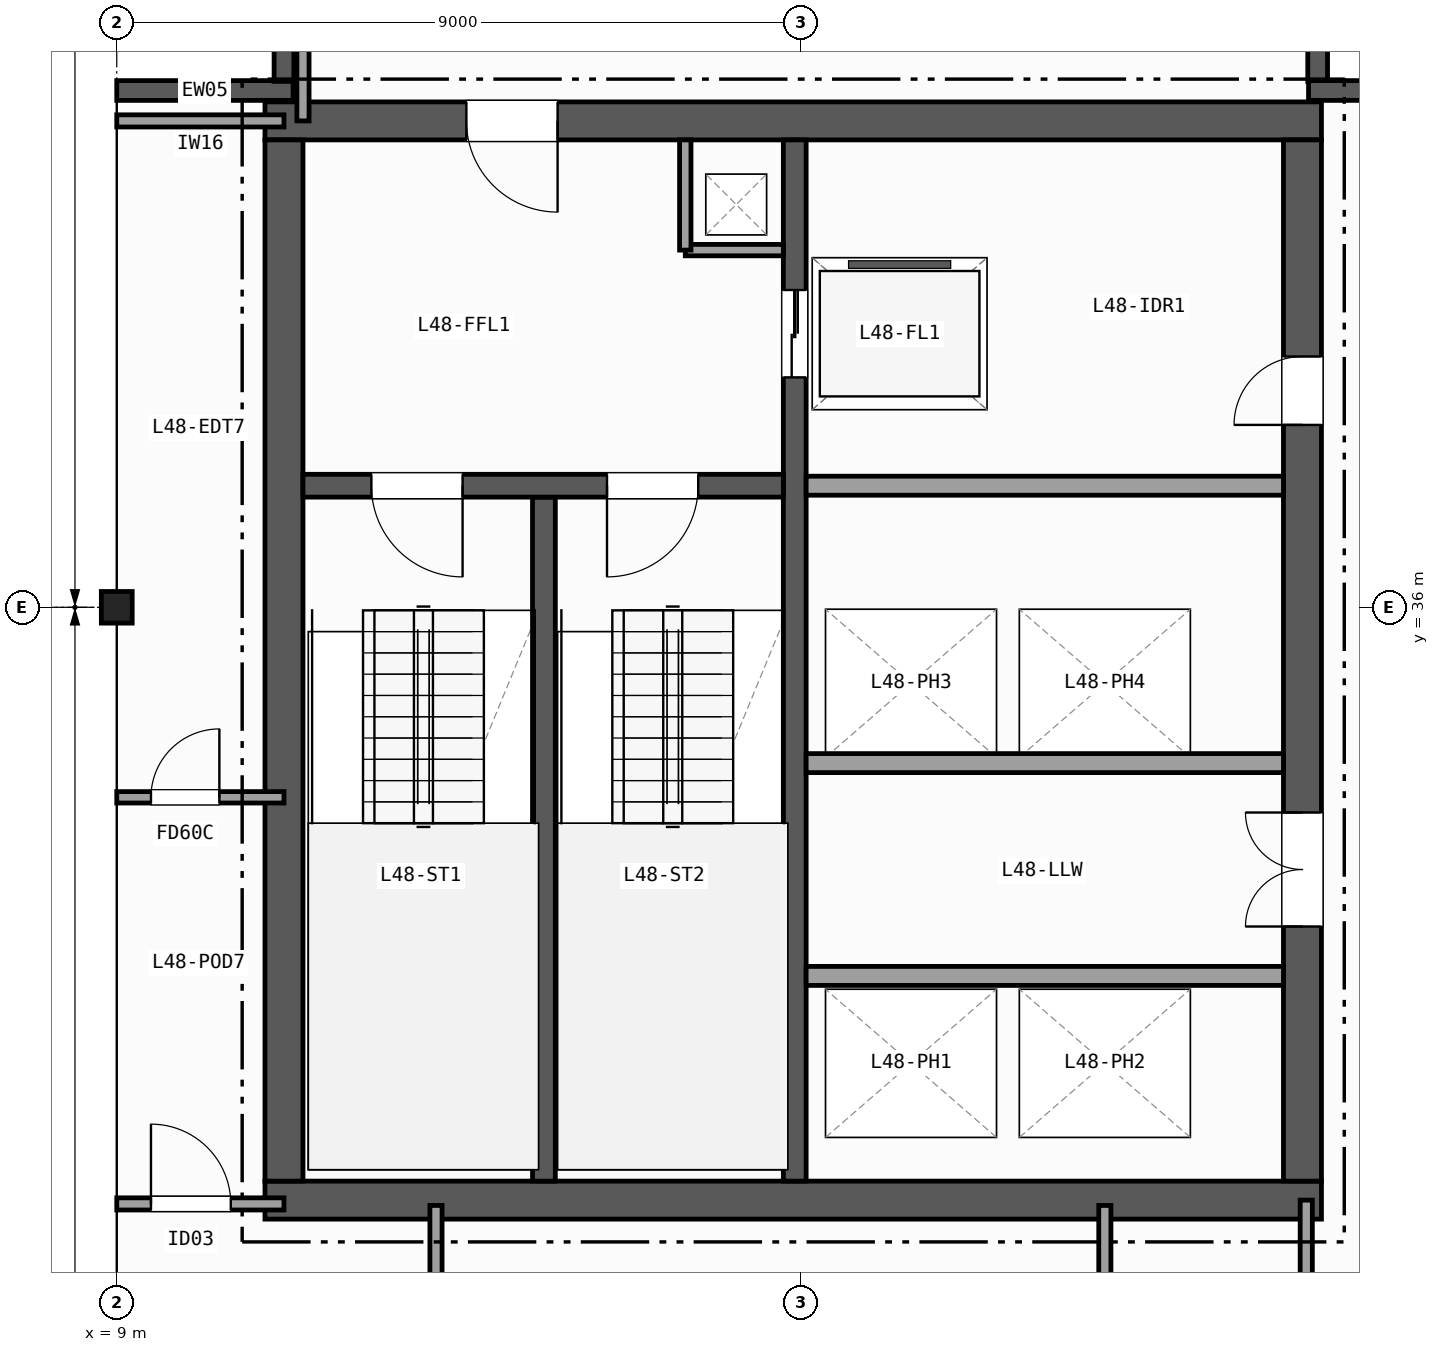
"""IFC4 building model, lengths in metres.
Left out: names, types, materials, properties, quantities, classifications, styles, units other than length and angle.
Written with IfcOpenShell. Run it as: python <this file> out.ifc"""

import sys

from ifc_helpers import new_model, si_unit, direction, frame, frame_2d, origin, origin_2d, place, context, subcontext, project, spatial, rectangle, i_section, extrude, element, fill, save


model = new_model("IFC4")
c1 = context("Model", 3, precision=1e-05, world=origin(), true_north=direction((0.0, 1.0)))
c2 = subcontext(c1, "Body", "Model", "MODEL_VIEW")
j1 = project(units=[si_unit("LENGTHUNIT", "METRE"), si_unit("PLANEANGLEUNIT", "RADIAN")], contexts=[c1])
p1 = place(None, origin())
s1 = spatial("IfcSite", under=j1, at=p1, CompositionType="ELEMENT")
p2 = place(p1, origin())
s2 = spatial("IfcBuilding", under=s1, at=p2, CompositionType="ELEMENT")
p3 = place(p2, frame((0.0, 0.0, 192.7)))
s3 = spatial("IfcBuildingStorey", under=s2, at=p3, CompositionType="ELEMENT", Elevation=192.7)
p4 = place(p3, frame((9.0, 36.0, 0.0), z_axis=(0.0, 0.0, 1.0), x_axis=(1.0, 0.0, 0.0)))
e1 = element("IfcColumn", 1, at=p4, inside=s3, PredefinedType="COLUMN", context=c2, shape_type="SweptSolid", body=[
    extrude(i_section(OverallWidth=0.406, OverallDepth=0.416, WebThickness=0.03, FlangeThickness=0.048, FilletRadius=0.015, at=origin_2d()), origin(), (0.0, 0.0, 1.0), 3.7),
])
p5 = place(p3, frame((9.0, 42.8, 0.0), z_axis=(0.0, 0.0, 1.0), x_axis=(1.0, 0.0, 0.0)))
e2 = element("IfcWall", 2, at=p5, inside=s3, PredefinedType="SOLIDWALL", context=c2, shape_type="SweptSolid", body=[
    extrude(rectangle(XDim=2.32, YDim=0.26, at=frame_2d((1.16, 0.0))), origin(), (0.0, 0.0, 1.0), 3.37),
])
for number, where, z_axis, x_axis in (
    (3, (11.2, 42.92, 0.0), (0.0, 0.0, 1.0), (0.0, 1.0, 0.0)),
    (4, (24.8, 45.0, 0.0), (0.0, 0.0, 1.0), (0.0, -1.0, 0.0)),
):
    element("IfcWall", number, at=place(p3, frame(where, z_axis=z_axis, x_axis=x_axis)), inside=s3, PredefinedType="SOLIDWALL", context=c2, shape_type="SweptSolid", body=[
        extrude(rectangle(XDim=2.08, YDim=0.26, at=frame_2d((1.04, 0.0))), origin(), (0.0, 0.0, 1.0), 3.37),
    ])
p6 = place(p3, frame((24.68, 42.8, 0.0), z_axis=(0.0, 0.0, 1.0), x_axis=(1.0, 0.0, 0.0)))
e5 = element("IfcWall", 5, at=p6, inside=s3, PredefinedType="SOLIDWALL", context=c2, shape_type="SweptSolid", body=[
    extrude(rectangle(XDim=2.32, YDim=0.26, at=frame_2d((1.16, 0.0))), origin(), (0.0, 0.0, 1.0), 3.37),
])
p7 = place(p3, frame((10.95, 28.2, 0.0), z_axis=(0.0, 0.0, 1.0), x_axis=(1.0, 0.0, 0.0)))
e6 = element("IfcWall", 6, at=p7, inside=s3, PredefinedType="SHEAR", context=c2, shape_type="SweptSolid", body=[
    extrude(rectangle(XDim=13.9, YDim=0.5, at=frame_2d((6.95, 0.0))), origin(), (0.0, 0.0, 1.0), 3.37),
])
p8 = place(p3, frame((24.85, 42.4, 0.0), z_axis=(0.0, 0.0, 1.0), x_axis=(-1.0, 0.0, 0.0)))
e7 = element("IfcWall", 7, at=p8, inside=s3, PredefinedType="SHEAR", context=c2, shape_type="SweptSolid", body=[
    extrude(rectangle(XDim=13.9, YDim=0.5, at=frame_2d((6.95, 0.0))), origin(), (0.0, 0.0, 1.0), 3.37),
])
p9 = place(p8, frame((10.05, 0.0, 0.0)))
e8 = element("IfcOpeningElement", 8, at=p9, cuts=e7, PredefinedType="OPENING", context=c2, shape_type="SweptSolid", body=[
    extrude(rectangle(XDim=1.2, YDim=2.15, at=frame_2d((0.6, 1.075))), frame((0.0, 0.26, 0.0), z_axis=(0.0, -1.0, 0.0), x_axis=(1.0, 0.0, 0.0)), (0.0, 0.0, 1.0), 0.52),
])
p10 = place(p3, frame((11.2, 42.15, 0.0), z_axis=(0.0, 0.0, 1.0), x_axis=(0.0, -1.0, 0.0)))
e9 = element("IfcWall", 9, at=p10, inside=s3, PredefinedType="SHEAR", context=c2, shape_type="SweptSolid", body=[
    extrude(rectangle(XDim=13.7, YDim=0.5, at=frame_2d((6.85, 0.0))), origin(), (0.0, 0.0, 1.0), 3.37),
])
p11 = place(p3, frame((24.6, 28.45, 0.0), z_axis=(0.0, 0.0, 1.0), x_axis=(0.0, 1.0, 0.0)))
e10 = element("IfcWall", 10, at=p11, inside=s3, PredefinedType="SHEAR", context=c2, shape_type="SweptSolid", body=[
    extrude(rectangle(XDim=13.7, YDim=0.5, at=frame_2d((6.85, 0.0))), origin(), (0.0, 0.0, 1.0), 3.37),
])
p12 = place(p11, frame((3.35, 0.0, 0.0)))
e11 = element("IfcOpeningElement", 11, at=p12, cuts=e10, PredefinedType="OPENING", context=c2, shape_type="SweptSolid", body=[
    extrude(rectangle(XDim=1.5, YDim=2.2, at=frame_2d((0.75, 1.1))), frame((0.0, 0.26, 0.0), z_axis=(0.0, -1.0, 0.0), x_axis=(1.0, 0.0, 0.0)), (0.0, 0.0, 1.0), 0.52),
])
p13 = place(p11, frame((9.95, 0.0, 0.0)))
e12 = element("IfcOpeningElement", 12, at=p13, cuts=e10, PredefinedType="OPENING", context=c2, shape_type="SweptSolid", body=[
    extrude(rectangle(XDim=0.9, YDim=2.1, at=frame_2d((0.45, 1.05))), frame((0.0, 0.26, 0.0), z_axis=(0.0, -1.0, 0.0), x_axis=(1.0, 0.0, 0.0)), (0.0, 0.0, 1.0), 0.52),
])
p14 = place(p3, frame((14.62, 28.45, 0.0), z_axis=(0.0, 0.0, 1.0), x_axis=(0.0, 1.0, 0.0)))
e13 = element("IfcWall", 13, at=p14, inside=s3, PredefinedType="SHEAR", context=c2, shape_type="SweptSolid", body=[
    extrude(rectangle(XDim=9.0, YDim=0.3, at=frame_2d((4.5, 0.0))), origin(), (0.0, 0.0, 1.0), 3.37),
])
p15 = place(p3, frame((17.92, 42.15, 0.0), z_axis=(0.0, 0.0, 1.0), x_axis=(0.0, -1.0, 0.0)))
e14 = element("IfcWall", 14, at=p15, inside=s3, PredefinedType="SHEAR", context=c2, shape_type="SweptSolid", body=[
    extrude(rectangle(XDim=13.7, YDim=0.3, at=frame_2d((6.85, 0.0))), origin(), (0.0, 0.0, 1.0), 3.37),
])
p16 = place(p15, frame((1.975, 0.0, 0.0)))
e15 = element("IfcOpeningElement", 15, at=p16, cuts=e14, PredefinedType="OPENING", context=c2, shape_type="SweptSolid", body=[
    extrude(rectangle(XDim=1.15, YDim=2.15, at=frame_2d((0.575, 1.075))), frame((0.0, 0.16, 0.0), z_axis=(0.0, -1.0, 0.0), x_axis=(1.0, 0.0, 0.0)), (0.0, 0.0, 1.0), 0.32),
])
p17 = place(p3, frame((17.77, 37.6, 0.0), z_axis=(0.0, 0.0, 1.0), x_axis=(-1.0, 0.0, 0.0)))
e16 = element("IfcWall", 16, at=p17, inside=s3, PredefinedType="SHEAR", context=c2, shape_type="SweptSolid", body=[
    extrude(rectangle(XDim=6.32, YDim=0.3, at=frame_2d((3.16, 0.0))), origin(), (0.0, 0.0, 1.0), 3.37),
])
p18 = place(p17, frame((4.22, 0.0, 0.0)))
e17 = element("IfcOpeningElement", 17, at=p18, cuts=e16, PredefinedType="OPENING", context=c2, shape_type="SweptSolid", body=[
    extrude(rectangle(XDim=1.2, YDim=2.15, at=frame_2d((0.6, 1.075))), frame((0.0, 0.16, 0.0), z_axis=(0.0, -1.0, 0.0), x_axis=(1.0, 0.0, 0.0)), (0.0, 0.0, 1.0), 0.32),
])
p19 = place(p17, frame((1.12, 0.0, 0.0)))
e18 = element("IfcOpeningElement", 18, at=p19, cuts=e16, PredefinedType="OPENING", context=c2, shape_type="SweptSolid", body=[
    extrude(rectangle(XDim=1.2, YDim=2.15, at=frame_2d((0.6, 1.075))), frame((0.0, 0.16, 0.0), z_axis=(0.0, -1.0, 0.0), x_axis=(1.0, 0.0, 0.0)), (0.0, 0.0, 1.0), 0.32),
])
p20 = place(p3, frame((16.48, 40.7, 0.0), z_axis=(0.0, 0.0, 1.0), x_axis=(1.0, 0.0, 0.0)))
e19 = element("IfcWall", 19, at=p20, inside=s3, PredefinedType="PARTITIONING", context=c2, shape_type="SweptSolid", body=[
    extrude(rectangle(XDim=1.29, YDim=0.15, at=frame_2d((0.645, 0.0))), origin(), (0.0, 0.0, 1.0), 3.37),
])
p21 = place(p3, frame((16.48, 40.7, 0.0), z_axis=(0.0, 0.0, 1.0), x_axis=(0.0, 1.0, 0.0)))
e20 = element("IfcWall", 20, at=p21, inside=s3, PredefinedType="PARTITIONING", context=c2, shape_type="SweptSolid", body=[
    extrude(rectangle(XDim=1.45, YDim=0.15, at=frame_2d((0.725, 0.0))), origin(), (0.0, 0.0, 1.0), 3.37),
])
for number, where, z_axis, x_axis in (
    (21, (18.07, 37.6, 0.0), (0.0, 0.0, 1.0), (1.0, 0.0, 0.0)),
    (22, (18.07, 31.15, 0.0), (0.0, 0.0, 1.0), (1.0, 0.0, 0.0)),
    (23, (24.35, 33.95, 0.0), (0.0, 0.0, 1.0), (-1.0, 0.0, 0.0)),
):
    element("IfcWall", number, at=place(p3, frame(where, z_axis=z_axis, x_axis=x_axis)), inside=s3, PredefinedType="PARTITIONING", context=c2, shape_type="SweptSolid", body=[
        extrude(rectangle(XDim=6.28, YDim=0.25, at=frame_2d((3.14, 0.0))), origin(), (0.0, 0.0, 1.0), 3.37),
    ])
p22 = place(p3, frame((9.0, 28.15, 0.0), z_axis=(0.0, 0.0, 1.0), x_axis=(1.0, 0.0, 0.0)))
e24 = element("IfcWall", 24, at=p22, inside=s3, PredefinedType="PARTITIONING", context=c2, shape_type="SweptSolid", body=[
    extrude(rectangle(XDim=2.2, YDim=0.16, at=frame_2d((1.1, 0.0))), origin(), (0.0, 0.0, 1.0), 2.584),
])
p23 = place(p22, frame((0.45, 0.0, 0.0)))
e25 = element("IfcOpeningElement", 25, at=p23, cuts=e24, PredefinedType="OPENING", context=c2, shape_type="SweptSolid", body=[
    extrude(rectangle(XDim=1.05, YDim=2.15, at=frame_2d((0.525, 1.075))), frame((0.0, 0.09, 0.0), z_axis=(0.0, -1.0, 0.0), x_axis=(1.0, 0.0, 0.0)), (0.0, 0.0, 1.0), 0.18),
])
p24 = place(p3, frame((9.0, 42.4, 0.0), z_axis=(0.0, 0.0, 1.0), x_axis=(1.0, 0.0, 0.0)))
e26 = element("IfcWall", 26, at=p24, inside=s3, PredefinedType="PARTITIONING", context=c2, shape_type="SweptSolid", body=[
    extrude(rectangle(XDim=2.2, YDim=0.16, at=frame_2d((1.1, 0.0))), origin(), (0.0, 0.0, 1.0), 3.37),
])
p25 = place(p3, frame((11.45, 42.4, 0.0), z_axis=(0.0, 0.0, 1.0), x_axis=(0.0, 1.0, 0.0)))
e27 = element("IfcWall", 27, at=p25, inside=s3, PredefinedType="PARTITIONING", context=c2, shape_type="SweptSolid", body=[
    extrude(rectangle(XDim=2.666, YDim=0.16, at=frame_2d((1.333, 0.0))), origin(), (0.0, 0.0, 1.0), 3.37),
])
p26 = place(p3, frame((9.0, 33.5, 0.0), z_axis=(0.0, 0.0, 1.0), x_axis=(1.0, 0.0, 0.0)))
e28 = element("IfcWall", 28, at=p26, inside=s3, PredefinedType="PARTITIONING", context=c2, shape_type="SweptSolid", body=[
    extrude(rectangle(XDim=2.2, YDim=0.15, at=frame_2d((1.1, 0.0))), origin(), (0.0, 0.0, 1.0), 2.584),
])
p27 = place(p26, frame((0.45, 0.0, 0.0)))
e29 = element("IfcOpeningElement", 29, at=p27, cuts=e28, PredefinedType="OPENING", context=c2, shape_type="SweptSolid", body=[
    extrude(rectangle(XDim=0.9, YDim=2.1, at=frame_2d((0.45, 1.05))), frame((0.0, 0.085, 0.0), z_axis=(0.0, -1.0, 0.0), x_axis=(1.0, 0.0, 0.0)), (0.0, 0.0, 1.0), 0.17),
])
p28 = place(p3, frame((24.65, 9.0, 0.0), z_axis=(0.0, 0.0, 1.0), x_axis=(0.0, 1.0, 0.0)))
e30 = element("IfcWall", 30, at=p28, inside=s3, PredefinedType="PARTITIONING", context=c2, shape_type="SweptSolid", body=[
    extrude(rectangle(XDim=19.2, YDim=0.16, at=frame_2d((9.6, 0.0))), origin(), (0.0, 0.0, 1.0), 2.584),
])
p29 = place(p28, frame((12.2, 0.0, 0.0)))
e31 = element("IfcOpeningElement", 31, at=p29, cuts=e30, PredefinedType="OPENING", context=c2, shape_type="SweptSolid", body=[
    extrude(rectangle(XDim=0.86, YDim=2.05, at=frame_2d((0.43, 1.025))), frame((0.0, 0.09, 0.0), z_axis=(0.0, -1.0, 0.0), x_axis=(1.0, 0.0, 0.0)), (0.0, 0.0, 1.0), 0.18),
])
p30 = place(p28, frame((4.2, 0.0, 0.0)))
e32 = element("IfcOpeningElement", 32, at=p30, cuts=e30, PredefinedType="OPENING", context=c2, shape_type="SweptSolid", body=[
    extrude(rectangle(XDim=0.95, YDim=2.1, at=frame_2d((0.475, 1.05))), frame((0.0, 0.09, 0.0), z_axis=(0.0, -1.0, 0.0), x_axis=(1.0, 0.0, 0.0)), (0.0, 0.0, 1.0), 0.18),
])
p31 = place(p3, frame((13.2, 18.0, 0.0), z_axis=(0.0, 0.0, 1.0), x_axis=(0.0, 1.0, 0.0)))
e33 = element("IfcWall", 33, at=p31, inside=s3, PredefinedType="PARTITIONING", context=c2, shape_type="SweptSolid", body=[
    extrude(rectangle(XDim=10.13, YDim=0.16, at=frame_2d((5.065, 0.0))), origin(), (0.0, 0.0, 1.0), 2.739),
])
p32 = place(p31, frame((2.5, 0.0, 0.0)))
e34 = element("IfcOpeningElement", 34, at=p32, cuts=e33, PredefinedType="OPENING", context=c2, shape_type="SweptSolid", body=[
    extrude(rectangle(XDim=1.0, YDim=2.1, at=frame_2d((0.5, 1.05))), frame((0.0, 0.09, 0.0), z_axis=(0.0, -1.0, 0.0), x_axis=(1.0, 0.0, 0.0)), (0.0, 0.0, 1.0), 0.18),
])
p33 = place(p3, frame((22.0, 18.0, 0.0), z_axis=(0.0, 0.0, 1.0), x_axis=(0.0, 1.0, 0.0)))
e35 = element("IfcWall", 35, at=p33, inside=s3, PredefinedType="PARTITIONING", context=c2, shape_type="SweptSolid", body=[
    extrude(rectangle(XDim=10.13, YDim=0.16, at=frame_2d((5.065, 0.0))), origin(), (0.0, 0.0, 1.0), 2.739),
])
p34 = place(p33, frame((2.5, 0.0, 0.0)))
e36 = element("IfcOpeningElement", 36, at=p34, cuts=e35, PredefinedType="OPENING", context=c2, shape_type="SweptSolid", body=[
    extrude(rectangle(XDim=1.05, YDim=2.15, at=frame_2d((0.525, 1.075))), frame((0.0, 0.09, 0.0), z_axis=(0.0, -1.0, 0.0), x_axis=(1.0, 0.0, 0.0)), (0.0, 0.0, 1.0), 0.18),
])
p35 = place(p18, origin())
e37 = element("IfcDoor", 37, at=p35, inside=s3, OperationType="SINGLE_SWING_LEFT", PredefinedType="DOOR", context=c2, shape_type="SweptSolid", body=[
    extrude(rectangle(XDim=1.2, YDim=2.15, at=frame_2d((0.6, 1.075))), frame((0.0, 0.025, 0.0), z_axis=(0.0, -1.0, 0.0), x_axis=(1.0, 0.0, 0.0)), (0.0, 0.0, 1.0), 0.05),
])
fill(e17, e37)
p36 = place(p19, origin())
e38 = element("IfcDoor", 38, at=p36, inside=s3, OperationType="SINGLE_SWING_RIGHT", PredefinedType="DOOR", context=c2, shape_type="SweptSolid", body=[
    extrude(rectangle(XDim=1.2, YDim=2.15, at=frame_2d((0.6, 1.075))), frame((0.0, 0.025, 0.0), z_axis=(0.0, -1.0, 0.0), x_axis=(1.0, 0.0, 0.0)), (0.0, 0.0, 1.0), 0.05),
])
fill(e18, e38)
p37 = place(p12, origin())
e39 = element("IfcDoor", 39, at=p37, inside=s3, OperationType="DOUBLE_DOOR_SINGLE_SWING", PredefinedType="DOOR", context=c2, shape_type="SweptSolid", body=[
    extrude(rectangle(XDim=1.5, YDim=2.2, at=frame_2d((0.75, 1.1))), frame((0.0, 0.025, 0.0), z_axis=(0.0, -1.0, 0.0), x_axis=(1.0, 0.0, 0.0)), (0.0, 0.0, 1.0), 0.05),
])
fill(e11, e39)
p38 = place(p9, origin())
e40 = element("IfcDoor", 40, at=p38, inside=s3, OperationType="SINGLE_SWING_LEFT", PredefinedType="DOOR", context=c2, shape_type="SweptSolid", body=[
    extrude(rectangle(XDim=1.2, YDim=2.15, at=frame_2d((0.6, 1.075))), frame((0.0, 0.025, 0.0), z_axis=(0.0, -1.0, 0.0), x_axis=(1.0, 0.0, 0.0)), (0.0, 0.0, 1.0), 0.05),
])
fill(e8, e40)
p39 = place(p13, origin())
e41 = element("IfcDoor", 41, at=p39, inside=s3, OperationType="SINGLE_SWING_LEFT", PredefinedType="DOOR", context=c2, shape_type="SweptSolid", body=[
    extrude(rectangle(XDim=0.9, YDim=2.1, at=frame_2d((0.45, 1.05))), frame((0.0, 0.025, 0.0), z_axis=(0.0, -1.0, 0.0), x_axis=(1.0, 0.0, 0.0)), (0.0, 0.0, 1.0), 0.05),
])
fill(e12, e41)
p40 = place(p16, origin())
e42 = element("IfcDoor", 42, at=p40, inside=s3, OperationType="DOUBLE_DOOR_SLIDING", PredefinedType="DOOR", context=c2, shape_type="SweptSolid", body=[
    extrude(rectangle(XDim=1.15, YDim=2.15, at=frame_2d((0.575, 1.075))), frame((0.0, 0.025, 0.0), z_axis=(0.0, -1.0, 0.0), x_axis=(1.0, 0.0, 0.0)), (0.0, 0.0, 1.0), 0.05),
])
fill(e15, e42)
p41 = place(p23, origin())
e43 = element("IfcDoor", 43, at=p41, inside=s3, OperationType="SINGLE_SWING_LEFT", PredefinedType="DOOR", context=c2, shape_type="SweptSolid", body=[
    extrude(rectangle(XDim=1.05, YDim=2.15, at=frame_2d((0.525, 1.075))), frame((0.0, 0.025, 0.0), z_axis=(0.0, -1.0, 0.0), x_axis=(1.0, 0.0, 0.0)), (0.0, 0.0, 1.0), 0.05),
])
fill(e25, e43)
p42 = place(p27, origin())
e44 = element("IfcDoor", 44, at=p42, inside=s3, OperationType="SINGLE_SWING_RIGHT", PredefinedType="DOOR", context=c2, shape_type="SweptSolid", body=[
    extrude(rectangle(XDim=0.9, YDim=2.1, at=frame_2d((0.45, 1.05))), frame((0.0, 0.025, 0.0), z_axis=(0.0, -1.0, 0.0), x_axis=(1.0, 0.0, 0.0)), (0.0, 0.0, 1.0), 0.05),
])
fill(e29, e44)
save(model, sys.argv[1])
